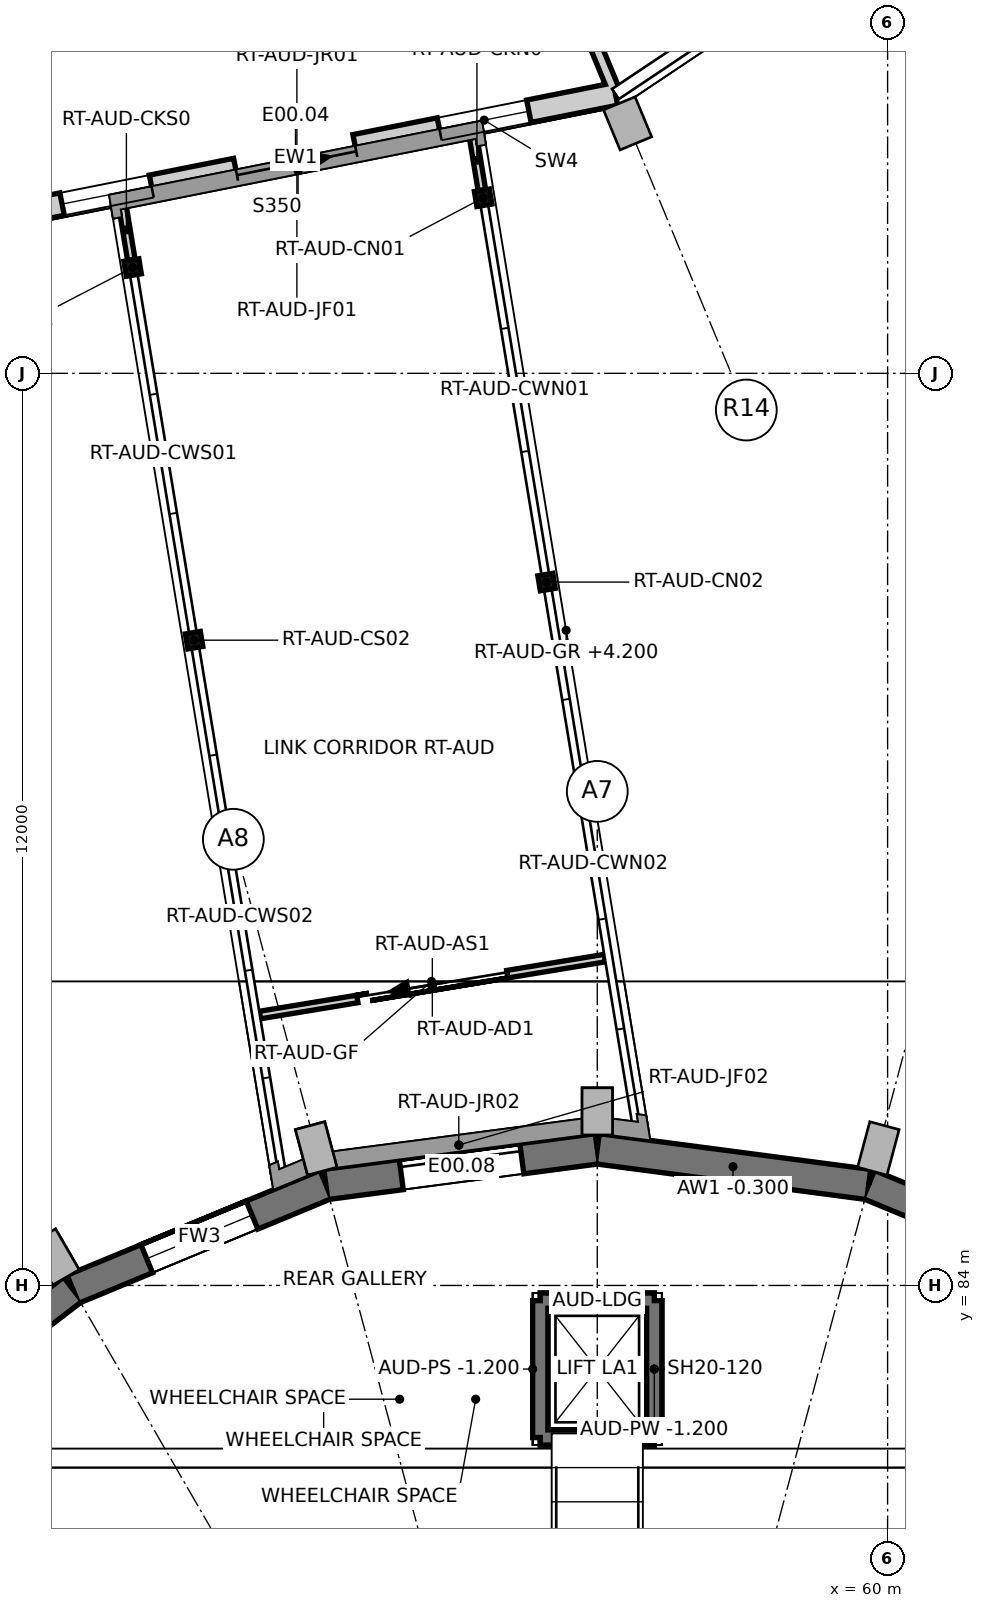
"""IFC4 building model, lengths in metres.
Left out: names, types, materials, properties, quantities, classifications, styles, units other than length and angle.
Written with IfcOpenShell. Run it as: python <this file> out.ifc"""

import sys

from ifc_helpers import new_model, si_unit, direction, frame, frame_2d, origin, origin_2d, place, context, subcontext, project, spatial, polyline, rectangle, hollow_rectangle, outline, extrude, element, fill, save


model = new_model("IFC4")
c1 = context("Model", 3, precision=1e-05, world=origin(), true_north=direction((0.0, 1.0)))
c2 = subcontext(c1, "Body", "Model", "MODEL_VIEW")
j1 = project(units=[si_unit("LENGTHUNIT", "METRE"), si_unit("PLANEANGLEUNIT", "RADIAN")], contexts=[c1])
p1 = place(None, origin())
s1 = spatial("IfcSite", under=j1, at=p1, CompositionType="ELEMENT")
p2 = place(p1, origin())
s2 = spatial("IfcBuilding", under=s1, at=p2, CompositionType="ELEMENT")
p3 = place(p2, origin())
s3 = spatial("IfcBuildingStorey", under=s2, at=p3, CompositionType="ELEMENT", Elevation=0.0)
p4 = place(p3, frame((63.079, 83.95, -0.3), z_axis=(0.0, 0.0, 1.0), x_axis=(-0.923883008779, 0.382675039804, 0.0)))
e1 = element("IfcWall", 1, at=p4, inside=s3, PredefinedType="SOLIDWALL", context=c2, shape_type="SweptSolid", body=[
    extrude(outline(polyline([(-0.026, -0.2), (3.628, -0.2), (3.576, 0.2), (0.026, 0.2), (-0.026, -0.2)])), origin(), (0.0, 0.0, 1.0), 6.3),
])
p5 = place(p4, frame((1.051, 0.0, 0.6)))
e2 = element("IfcOpeningElement", 2, at=p5, cuts=e1, PredefinedType="OPENING", context=c2, shape_type="SweptSolid", body=[
    extrude(rectangle(XDim=1.5, YDim=2.1, at=frame_2d((0.75, 1.05))), frame((0.0, 0.21, 0.0), z_axis=(0.0, -1.0, 0.0), x_axis=(1.0, 0.0, 0.0)), (0.0, 0.0, 1.0), 0.42),
])
p6 = place(p3, frame((59.751, 85.328, -0.3), z_axis=(0.0, 0.0, 1.0), x_axis=(-0.99144206373, 0.130547440674, 0.0)))
e3 = element("IfcWall", 3, at=p6, inside=s3, PredefinedType="SOLIDWALL", context=c2, shape_type="SweptSolid", body=[
    extrude(outline(polyline([(-0.026, -0.2), (3.628, -0.2), (3.575, 0.2), (0.026, 0.2), (-0.026, -0.2)])), origin(), (0.0, 0.0, 1.0), 6.3),
])
p7 = place(p3, frame((56.18, 85.798, -0.3), z_axis=(0.0, 0.0, 1.0), x_axis=(-0.991443218791, -0.130538668266, 0.0)))
e4 = element("IfcWall", 4, at=p7, inside=s3, PredefinedType="SOLIDWALL", context=c2, shape_type="SweptSolid", body=[
    extrude(outline(polyline([(-0.026, -0.2), (3.628, -0.2), (3.576, 0.2), (0.026, 0.2), (-0.026, -0.2)])), origin(), (0.0, 0.0, 1.0), 6.3),
])
p8 = place(p7, frame((1.001, 0.0, 0.3)))
e5 = element("IfcOpeningElement", 5, at=p8, cuts=e4, PredefinedType="OPENING", context=c2, shape_type="SweptSolid", body=[
    extrude(rectangle(XDim=1.6, YDim=2.4, at=frame_2d((0.8, 1.2))), frame((0.0, 0.21, 0.0), z_axis=(0.0, -1.0, 0.0), x_axis=(1.0, 0.0, 0.0)), (0.0, 0.0, 1.0), 0.42),
])
p9 = place(p3, frame((52.609, 85.328, -0.3), z_axis=(0.0, 0.0, 1.0), x_axis=(-0.923883008779, -0.382675039804, 0.0)))
e6 = element("IfcWall", 6, at=p9, inside=s3, PredefinedType="SOLIDWALL", context=c2, shape_type="SweptSolid", body=[
    extrude(outline(polyline([(-0.026, -0.2), (3.628, -0.2), (3.576, 0.2), (0.026, 0.2), (-0.026, -0.2)])), origin(), (0.0, 0.0, 1.0), 6.3),
])
p10 = place(p9, frame((1.051, 0.0, 0.6)))
e7 = element("IfcOpeningElement", 7, at=p10, cuts=e6, PredefinedType="OPENING", context=c2, shape_type="SweptSolid", body=[
    extrude(rectangle(XDim=1.5, YDim=2.1, at=frame_2d((0.75, 1.05))), frame((0.0, 0.21, 0.0), z_axis=(0.0, -1.0, 0.0), x_axis=(1.0, 0.0, 0.0)), (0.0, 0.0, 1.0), 0.42),
])
p11 = place(p3, frame((49.281, 83.95, -0.3), z_axis=(0.0, 0.0, 1.0), x_axis=(-0.793339015417, -0.608780097093, 0.0)))
e8 = element("IfcWall", 8, at=p11, inside=s3, PredefinedType="SOLIDWALL", context=c2, shape_type="SweptSolid", body=[
    extrude(outline(polyline([(-0.026, -0.2), (3.628, -0.2), (3.576, 0.2), (0.026, 0.2), (-0.026, -0.2)])), origin(), (0.0, 0.0, 1.0), 6.3),
])
p12 = place(p11, frame((0.901, 0.0, 0.3)))
e9 = element("IfcOpeningElement", 9, at=p12, cuts=e8, PredefinedType="OPENING", context=c2, shape_type="SweptSolid", body=[
    extrude(rectangle(XDim=1.8, YDim=2.4, at=frame_2d((0.9, 1.2))), frame((0.0, 0.21, 0.0), z_axis=(0.0, -1.0, 0.0), x_axis=(1.0, 0.0, 0.0)), (0.0, 0.0, 1.0), 0.42),
])
p13 = place(p3, frame((45.867, 80.828, 3.0), z_axis=(0.0, 0.0, 1.0), x_axis=(1.0, 0.0, 0.0)))
e10 = element("IfcWall", 10, at=p13, inside=s3, PredefinedType="SOLIDWALL", context=c2, shape_type="SweptSolid", body=[
    extrude(rectangle(XDim=20.626, YDim=0.25, at=frame_2d((10.313, 0.0))), origin(), (0.0, 0.0, 1.0), 2.4),
])
p14 = place(p3, frame((46.558, 81.729, 3.0), z_axis=(0.0, 0.0, 1.0), x_axis=(1.0, 0.0, 0.0)))
e11 = element("IfcWall", 11, at=p14, inside=s3, PredefinedType="SOLIDWALL", context=c2, shape_type="SweptSolid", body=[
    extrude(rectangle(XDim=19.245, YDim=0.25, at=frame_2d((9.623, 0.0))), origin(), (0.0, 0.0, 1.0), 2.7),
])
for number, where, z_axis, x_axis in (
    (12, (54.678, 98.309, 0.0), (0.0, 0.0, 1.0), (0.163, -0.987, 0.0)),
    (13, (50.066, 97.392, 0.0), (0.0, 0.0, 1.0), (0.163, -0.987, 0.0)),
    (14, (55.513, 93.254, 0.0), (0.0, 0.0, 1.0), (0.163, -0.987, 0.0)),
    (15, (50.876, 92.489, 0.0), (0.0, 0.0, 1.0), (0.163, -0.987, 0.0)),
):
    element("IfcColumn", number, at=place(p3, frame(where, z_axis=z_axis, x_axis=x_axis)), inside=s3, PredefinedType="COLUMN", context=c2, shape_type="SweptSolid", body=[
        extrude(hollow_rectangle(XDim=0.2, YDim=0.2, WallThickness=0.01, at=origin_2d()), origin(), (0.0, 0.0, 1.0), 3.8),
    ])
for number, where, z_axis, x_axis in (
    (16, (54.532, 99.197, 0.0), (0.0, 0.0, 1.0), (0.163, -0.987, 0.0)),
    (17, (49.92, 98.28, 0.0), (0.0, 0.0, 1.0), (0.163, -0.987, 0.0)),
):
    element("IfcWall", number, at=place(p3, frame(where, z_axis=z_axis, x_axis=x_axis)), inside=s3, PredefinedType="PARTITIONING", context=c2, shape_type="SweptSolid", body=[
        extrude(rectangle(XDim=0.798, YDim=0.1, at=frame_2d((0.399, 0.0))), origin(), (0.0, 0.0, 1.0), 3.8),
    ])
p15 = place(p3, frame((56.279, 88.307, 0.0), z_axis=(0.0, 0.0, 1.0), x_axis=(-0.986645220753, -0.162884033485, 0.0)))
e18 = element("IfcWall", 18, at=p15, inside=s3, PredefinedType="PARTITIONING", context=c2, shape_type="SweptSolid", body=[
    extrude(rectangle(XDim=4.6, YDim=0.1, at=frame_2d((2.3, 0.0))), origin(), (0.0, 0.0, 1.0), 3.8),
])
p16 = place(p15, frame((1.3, 0.0, 0.0)))
e19 = element("IfcOpeningElement", 19, at=p16, cuts=e18, PredefinedType="OPENING", context=c2, shape_type="SweptSolid", body=[
    extrude(rectangle(XDim=2.0, YDim=2.4, at=frame_2d((1.0, 1.2))), frame((0.0, 0.06, 0.0), z_axis=(0.0, -1.0, 0.0), x_axis=(1.0, 0.0, 0.0)), (0.0, 0.0, 1.0), 0.12),
])
p17 = place(p3, frame((48.0, 98.0, 0.0), z_axis=(0.0, 0.0, 1.0), x_axis=(0.980786880766, 0.195082276278, 0.0)))
e20 = element("IfcWall", 20, at=p17, inside=s3, PredefinedType="SOLIDWALL", context=c2, shape_type="SweptSolid", body=[
    extrude(outline(polyline([(-0.03, -0.15), (8.614, -0.15), (8.554, 0.15), (0.03, 0.15), (-0.03, -0.15)])), origin(), (0.0, 0.0, 1.0), 4.9),
])
p18 = place(p17, frame((3.492, 0.0, 0.0)))
e21 = element("IfcOpeningElement", 21, at=p18, cuts=e20, PredefinedType="OPENING", context=c2, shape_type="SweptSolid", body=[
    extrude(rectangle(XDim=1.6, YDim=2.4, at=frame_2d((0.8, 1.2))), frame((0.0, 0.16, 0.0), z_axis=(0.0, -1.0, 0.0), x_axis=(1.0, 0.0, 0.0)), (0.0, 0.0, 1.0), 0.32),
])
p19 = place(p17, frame((1.161, 0.0, 0.2)))
e22 = element("IfcOpeningElement", 22, at=p19, cuts=e20, PredefinedType="OPENING", context=c2, shape_type="SweptSolid", body=[
    extrude(rectangle(XDim=1.2, YDim=3.2, at=frame_2d((0.6, 1.6))), frame((0.0, 0.16, 0.0), z_axis=(0.0, -1.0, 0.0), x_axis=(1.0, 0.0, 0.0)), (0.0, 0.0, 1.0), 0.32),
])
p20 = place(p17, frame((6.223, 0.0, 0.2)))
e23 = element("IfcOpeningElement", 23, at=p20, cuts=e20, PredefinedType="OPENING", context=c2, shape_type="SweptSolid", body=[
    extrude(rectangle(XDim=1.2, YDim=3.2, at=frame_2d((0.6, 1.6))), frame((0.0, 0.16, 0.0), z_axis=(0.0, -1.0, 0.0), x_axis=(1.0, 0.0, 0.0)), (0.0, 0.0, 1.0), 0.32),
])
p21 = place(p3, frame((55.076, 102.917, 0.0), z_axis=(0.0, 0.0, 1.0), x_axis=(0.382654004196, -0.923891721509, 0.0)))
e24 = element("IfcWall", 24, at=p21, inside=s3, PredefinedType="PARTITIONING", context=c2, shape_type="SweptSolid", body=[
    extrude(rectangle(XDim=3.448, YDim=0.15, at=frame_2d((1.724, 0.0))), origin(), (0.0, 0.0, 1.0), 4.9),
])
p22 = place(p3, frame((55.43, 82.0, -1.2), z_axis=(0.0, 0.0, 1.0), x_axis=(1.0, 0.0, 0.0)))
e25 = element("IfcWall", 25, at=p22, inside=s3, PredefinedType="SOLIDWALL", context=c2, shape_type="SweptSolid", body=[
    extrude(outline(polyline([(-0.1, -0.1), (1.6, -0.1), (1.4, 0.1), (0.1, 0.1), (-0.1, -0.1)])), origin(), (0.0, 0.0, 1.0), 1.2),
])
p23 = place(p3, frame((56.93, 82.0, -1.2), z_axis=(0.0, 0.0, 1.0), x_axis=(0.0, 1.0, 0.0)))
e26 = element("IfcWall", 26, at=p23, inside=s3, PredefinedType="SOLIDWALL", context=c2, shape_type="SweptSolid", body=[
    extrude(outline(polyline([(-0.1, -0.1), (1.9, -0.1), (1.7, 0.1), (0.1, 0.1), (-0.1, -0.1)])), origin(), (0.0, 0.0, 1.0), 1.2),
])
p24 = place(p3, frame((56.93, 83.8, -1.2), z_axis=(0.0, 0.0, 1.0), x_axis=(-1.0, 0.0, 0.0)))
e27 = element("IfcWall", 27, at=p24, inside=s3, PredefinedType="SOLIDWALL", context=c2, shape_type="SweptSolid", body=[
    extrude(outline(polyline([(-0.1, -0.1), (1.6, -0.1), (1.4, 0.1), (0.1, 0.1), (-0.1, -0.1)])), origin(), (0.0, 0.0, 1.0), 1.2),
])
p25 = place(p3, frame((55.43, 83.8, -1.2), z_axis=(0.0, 0.0, 1.0), x_axis=(0.0, -1.0, 0.0)))
e28 = element("IfcWall", 28, at=p25, inside=s3, PredefinedType="SOLIDWALL", context=c2, shape_type="SweptSolid", body=[
    extrude(outline(polyline([(-0.1, -0.1), (1.9, -0.1), (1.7, 0.1), (0.1, 0.1), (-0.1, -0.1)])), origin(), (0.0, 0.0, 1.0), 1.2),
])
p26 = place(p3, frame((55.43, 82.0, 0.0), z_axis=(0.0, 0.0, 1.0), x_axis=(1.0, 0.0, 0.0)))
e29 = element("IfcWall", 29, at=p26, inside=s3, PredefinedType="SOLIDWALL", context=c2, shape_type="SweptSolid", body=[
    extrude(outline(polyline([(-0.1, -0.1), (1.6, -0.1), (1.4, 0.1), (0.1, 0.1), (-0.1, -0.1)])), origin(), (0.0, 0.0, 1.0), 6.0),
])
p27 = place(p3, frame((56.93, 82.0, 0.0), z_axis=(0.0, 0.0, 1.0), x_axis=(0.0, 1.0, 0.0)))
e30 = element("IfcWall", 30, at=p27, inside=s3, PredefinedType="SOLIDWALL", context=c2, shape_type="SweptSolid", body=[
    extrude(outline(polyline([(-0.1, -0.1), (1.9, -0.1), (1.7, 0.1), (0.1, 0.1), (-0.1, -0.1)])), origin(), (0.0, 0.0, 1.0), 6.0),
])
p28 = place(p3, frame((56.93, 83.8, 0.0), z_axis=(0.0, 0.0, 1.0), x_axis=(-1.0, 0.0, 0.0)))
e31 = element("IfcWall", 31, at=p28, inside=s3, PredefinedType="SOLIDWALL", context=c2, shape_type="SweptSolid", body=[
    extrude(outline(polyline([(-0.1, -0.1), (1.6, -0.1), (1.4, 0.1), (0.1, 0.1), (-0.1, -0.1)])), origin(), (0.0, 0.0, 1.0), 6.0),
])
p29 = place(p28, frame((0.3, 0.0, 0.0)))
e32 = element("IfcOpeningElement", 32, at=p29, cuts=e31, PredefinedType="OPENING", context=c2, shape_type="SweptSolid", body=[
    extrude(rectangle(XDim=0.9, YDim=2.1, at=frame_2d((0.45, 1.05))), frame((0.0, 0.11, 0.0), z_axis=(0.0, -1.0, 0.0), x_axis=(1.0, 0.0, 0.0)), (0.0, 0.0, 1.0), 0.22),
])
p30 = place(p3, frame((55.43, 83.8, 0.0), z_axis=(0.0, 0.0, 1.0), x_axis=(0.0, -1.0, 0.0)))
e33 = element("IfcWall", 33, at=p30, inside=s3, PredefinedType="SOLIDWALL", context=c2, shape_type="SweptSolid", body=[
    extrude(outline(polyline([(-0.1, -0.1), (1.9, -0.1), (1.7, 0.1), (0.1, 0.1), (-0.1, -0.1)])), origin(), (0.0, 0.0, 1.0), 6.0),
])
p31 = place(p16, origin())
e34 = element("IfcDoor", 34, at=p31, inside=s3, OperationType="DOUBLE_DOOR_SLIDING", PredefinedType="DOOR", context=c2, shape_type="SweptSolid", body=[
    extrude(rectangle(XDim=2.0, YDim=2.4, at=frame_2d((1.0, 1.2))), frame((0.0, 0.025, 0.0), z_axis=(0.0, -1.0, 0.0), x_axis=(1.0, 0.0, 0.0)), (0.0, 0.0, 1.0), 0.05),
])
fill(e19, e34)
p32 = place(p18, origin())
e35 = element("IfcDoor", 35, at=p32, inside=s3, OperationType="DOUBLE_DOOR_DOUBLE_SWING", PredefinedType="DOOR", context=c2, shape_type="SweptSolid", body=[
    extrude(rectangle(XDim=1.6, YDim=2.4, at=frame_2d((0.8, 1.2))), frame((0.0, 0.025, 0.0), z_axis=(0.0, -1.0, 0.0), x_axis=(1.0, 0.0, 0.0)), (0.0, 0.0, 1.0), 0.05),
])
fill(e21, e35)
p33 = place(p19, origin())
e36 = element("IfcWindow", 36, at=p33, inside=s3, PartitioningType="SINGLE_PANEL", PredefinedType="WINDOW", context=c2, shape_type="SweptSolid", body=[
    extrude(rectangle(XDim=1.2, YDim=3.2, at=frame_2d((0.6, 1.6))), frame((0.0, 0.03, 0.0), z_axis=(0.0, -1.0, 0.0), x_axis=(1.0, 0.0, 0.0)), (0.0, 0.0, 1.0), 0.06),
])
fill(e22, e36)
p34 = place(p20, origin())
e37 = element("IfcWindow", 37, at=p34, inside=s3, PartitioningType="SINGLE_PANEL", PredefinedType="WINDOW", context=c2, shape_type="SweptSolid", body=[
    extrude(rectangle(XDim=1.2, YDim=3.2, at=frame_2d((0.6, 1.6))), frame((0.0, 0.03, 0.0), z_axis=(0.0, -1.0, 0.0), x_axis=(1.0, 0.0, 0.0)), (0.0, 0.0, 1.0), 0.06),
])
fill(e23, e37)
p35 = place(p8, origin())
e38 = element("IfcDoor", 38, at=p35, inside=s3, OperationType="DOUBLE_DOOR_DOUBLE_SWING", PredefinedType="DOOR", context=c2, shape_type="SweptSolid", body=[
    extrude(rectangle(XDim=1.6, YDim=2.4, at=frame_2d((0.8, 1.2))), frame((0.0, 0.025, 0.0), z_axis=(0.0, -1.0, 0.0), x_axis=(1.0, 0.0, 0.0)), (0.0, 0.0, 1.0), 0.05),
])
fill(e5, e38)
p36 = place(p10, origin())
e39 = element("IfcWindow", 39, at=p36, inside=s3, PartitioningType="DOUBLE_PANEL_VERTICAL", PredefinedType="WINDOW", context=c2, shape_type="SweptSolid", body=[
    extrude(rectangle(XDim=1.5, YDim=2.1, at=frame_2d((0.75, 1.05))), frame((0.0, 0.03, 0.0), z_axis=(0.0, -1.0, 0.0), x_axis=(1.0, 0.0, 0.0)), (0.0, 0.0, 1.0), 0.06),
])
fill(e7, e39)
p37 = place(p29, origin())
e40 = element("IfcDoor", 40, at=p37, inside=s3, OperationType="DOUBLE_DOOR_SLIDING", PredefinedType="DOOR", context=c2, shape_type="SweptSolid", body=[
    extrude(rectangle(XDim=0.9, YDim=2.1, at=frame_2d((0.45, 1.05))), frame((0.0, 0.025, 0.0), z_axis=(0.0, -1.0, 0.0), x_axis=(1.0, 0.0, 0.0)), (0.0, 0.0, 1.0), 0.05),
])
fill(e32, e40)
save(model, sys.argv[1])
